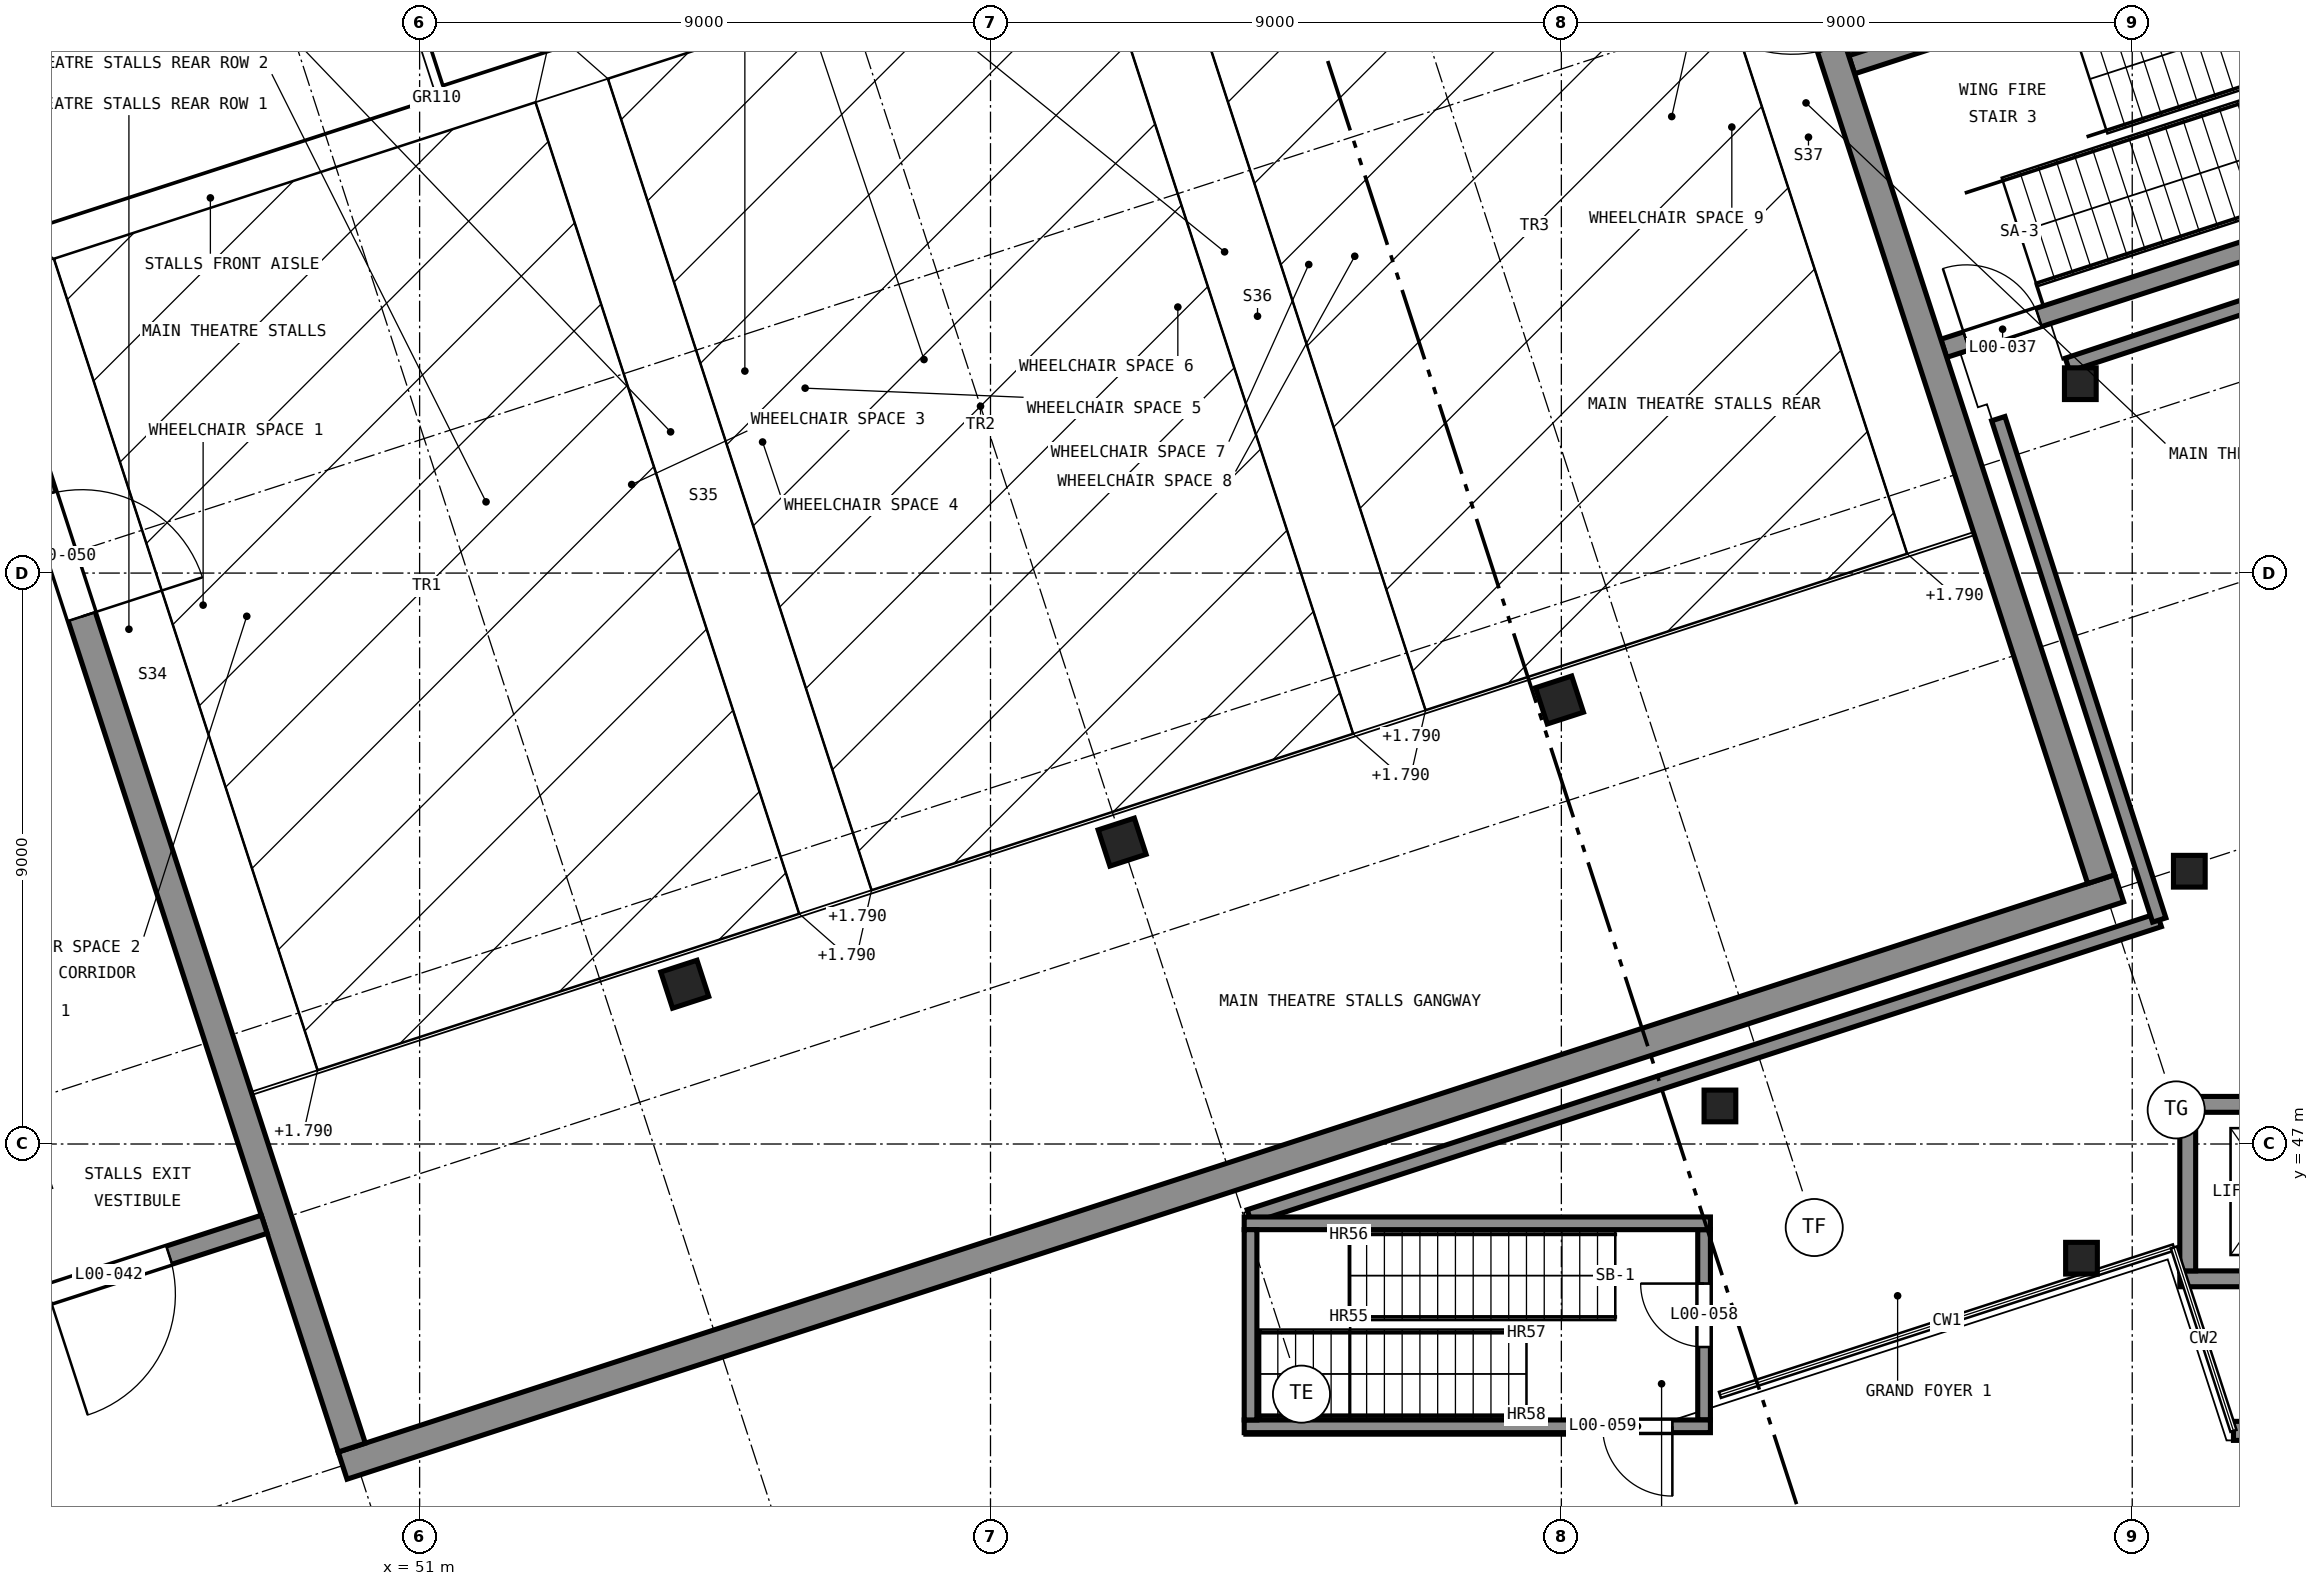
"""IFC4 building model, lengths in metres.
Left out: names, types, materials, properties, quantities, classifications, styles, units other than length and angle.
Written with IfcOpenShell. Run it as: python <this file> out.ifc"""

import sys

from ifc_helpers import new_model, si_unit, direction, frame, frame_2d, origin, origin_2d, place, context, subcontext, project, spatial, rectangle, extrude, element, fill, save


model = new_model("IFC4")
c1 = context("Model", 3, precision=1e-05, world=origin(), true_north=direction((0.0, 1.0)))
c2 = subcontext(c1, "Body", "Model", "MODEL_VIEW")
j1 = project(units=[si_unit("LENGTHUNIT", "METRE"), si_unit("PLANEANGLEUNIT", "RADIAN")], contexts=[c1])
p1 = place(None, origin())
s1 = spatial("IfcSite", under=j1, at=p1, CompositionType="ELEMENT")
p2 = place(p1, origin())
s2 = spatial("IfcBuilding", under=s1, at=p2, CompositionType="ELEMENT")
p3 = place(p2, origin())
s3 = spatial("IfcBuildingStorey", under=s2, at=p3, CompositionType="ELEMENT", Elevation=0.0)
p4 = place(p3, frame((49.786, 41.93, 0.0), z_axis=(0.0, 0.0, 1.0), x_axis=(0.951055937194, 0.309018776661, 0.0)))
e1 = element("IfcWall", 1, at=p4, inside=s3, PredefinedType="SHEAR", context=c2, shape_type="SweptSolid", body=[
    extrude(rectangle(XDim=29.45, YDim=0.45, at=frame_2d((14.725, 0.0))), origin(), (0.0, 0.0, 1.0), 5.5),
])
p5 = place(p3, frame((49.93, 42.214, 0.0), z_axis=(0.0, 0.0, 1.0), x_axis=(-0.309016215614, 0.95105676933, 0.0)))
e2 = element("IfcWall", 2, at=p5, inside=s3, PredefinedType="SHEAR", context=c2, shape_type="SweptSolid", body=[
    extrude(rectangle(XDim=27.975, YDim=0.45, at=frame_2d((13.988, 0.0))), origin(), (0.0, 0.0, 1.0), 5.5),
])
p6 = place(p5, frame((13.775, 0.0, 0.0)))
e3 = element("IfcOpeningElement", 3, at=p6, cuts=e2, PredefinedType="OPENING", context=c2, shape_type="SweptSolid", body=[
    extrude(rectangle(XDim=2.0, YDim=2.4, at=frame_2d((1.0, 1.2))), frame((0.0, 0.235, 0.0), z_axis=(0.0, -1.0, 0.0), x_axis=(1.0, 0.0, 0.0)), (0.0, 0.0, 1.0), 0.47),
])
p7 = place(p3, frame((77.511, 51.176, 0.0), z_axis=(0.0, 0.0, 1.0), x_axis=(-0.309018780445, 0.951055935964, 0.0)))
e4 = element("IfcWall", 4, at=p7, inside=s3, PredefinedType="SHEAR", context=c2, shape_type="SweptSolid", body=[
    extrude(rectangle(XDim=27.975, YDim=0.45, at=frame_2d((13.987, 0.0))), origin(), (0.0, 0.0, 1.0), 5.5),
])
p8 = place(p7, frame((13.775, 0.0, 0.0)))
e5 = element("IfcOpeningElement", 5, at=p8, cuts=e4, PredefinedType="OPENING", context=c2, shape_type="SweptSolid", body=[
    extrude(rectangle(XDim=2.0, YDim=2.4, at=frame_2d((1.0, 1.2))), frame((0.0, 0.235, 0.0), z_axis=(0.0, -1.0, 0.0), x_axis=(1.0, 0.0, 0.0)), (0.0, 0.0, 1.0), 0.47),
])
p9 = place(p3, frame((48.55, 45.735, 0.0), z_axis=(0.0, 0.0, 1.0), x_axis=(-0.951061216338, -0.309002528757, 0.0)))
e6 = element("IfcWall", 6, at=p9, inside=s3, PredefinedType="SOLIDWALL", context=c2, shape_type="SweptSolid", body=[
    extrude(rectangle(XDim=15.925, YDim=0.3, at=frame_2d((7.962, 0.0))), origin(), (0.0, 0.0, 1.0), 5.5),
])
p10 = place(p9, frame((13.075, 0.0, 0.0)))
e7 = element("IfcOpeningElement", 7, at=p10, cuts=e6, PredefinedType="OPENING", context=c2, shape_type="SweptSolid", body=[
    extrude(rectangle(XDim=1.2, YDim=2.1, at=frame_2d((0.6, 1.05))), frame((0.0, 0.16, 0.0), z_axis=(0.0, -1.0, 0.0), x_axis=(1.0, 0.0, 0.0)), (0.0, 0.0, 1.0), 0.32),
])
p11 = place(p9, frame((1.575, 0.0, 0.0)))
e8 = element("IfcOpeningElement", 8, at=p11, cuts=e6, PredefinedType="OPENING", context=c2, shape_type="SweptSolid", body=[
    extrude(rectangle(XDim=2.0, YDim=2.4, at=frame_2d((1.0, 1.2))), frame((0.0, 0.16, 0.0), z_axis=(0.0, -1.0, 0.0), x_axis=(1.0, 0.0, 0.0)), (0.0, 0.0, 1.0), 0.32),
])
p12 = place(p3, frame((75.029, 59.543, 0.0), z_axis=(0.0, 0.0, 1.0), x_axis=(0.951057649576, 0.309013506475, 0.0)))
e9 = element("IfcWall", 9, at=p12, inside=s3, PredefinedType="SOLIDWALL", context=c2, shape_type="SweptSolid", body=[
    extrude(rectangle(XDim=7.075, YDim=0.3, at=frame_2d((3.538, 0.0))), origin(), (0.0, 0.0, 1.0), 5.2),
])
p13 = place(p12, frame((0.375, 0.0, 0.0)))
e10 = element("IfcOpeningElement", 10, at=p13, cuts=e9, PredefinedType="OPENING", context=c2, shape_type="SweptSolid", body=[
    extrude(rectangle(XDim=1.2, YDim=2.1, at=frame_2d((0.6, 1.05))), frame((0.0, 0.16, 0.0), z_axis=(0.0, -1.0, 0.0), x_axis=(1.0, 0.0, 0.0)), (0.0, 0.0, 1.0), 0.32),
])
p14 = place(p3, frame((80.305, 66.199, 0.0), z_axis=(0.0, 0.0, 1.0), x_axis=(-0.951054354327, -0.309023648149, 0.0)))
e11 = element("IfcWall", 11, at=p14, inside=s3, PredefinedType="SOLIDWALL", context=c2, shape_type="SweptSolid", body=[
    extrude(rectangle(XDim=7.075, YDim=0.3, at=frame_2d((3.537, 0.0))), origin(), (0.0, 0.0, 1.0), 5.2),
])
for number, where, z_axis, x_axis in (
    (12, (55.18, 49.519, 0.0), (0.0, 0.0, 1.0), (0.951, 0.309, 0.0)),
    (13, (62.075, 51.759, 0.0), (0.0, 0.0, 1.0), (0.951, 0.309, 0.0)),
    (14, (68.97, 54.0, 0.0), (0.0, 0.0, 1.0), (0.951, 0.309, 0.0)),
):
    element("IfcColumn", number, at=place(p3, frame(where, z_axis=z_axis, x_axis=x_axis)), inside=s3, PredefinedType="COLUMN", context=c2, shape_type="SweptSolid", body=[
        extrude(rectangle(XDim=0.6, YDim=0.6, at=origin_2d()), origin(), (0.0, 0.0, 1.0), 0.55),
    ])
p15 = place(p3, frame((64.0, 42.55, 0.0), z_axis=(0.0, 0.0, 1.0), x_axis=(1.0, 0.0, 0.0)))
e15 = element("IfcWall", 15, at=p15, inside=s3, PredefinedType="SHEAR", context=c2, shape_type="SweptSolid", body=[
    extrude(rectangle(XDim=7.35, YDim=0.2, at=frame_2d((3.675, 0.0))), origin(), (0.0, 0.0, 1.0), 5.5),
])
p16 = place(p15, frame((5.65, 0.0, 0.0)))
e16 = element("IfcOpeningElement", 16, at=p16, cuts=e15, PredefinedType="OPENING", context=c2, shape_type="SweptSolid", body=[
    extrude(rectangle(XDim=1.1, YDim=2.1, at=frame_2d((0.55, 1.05))), frame((0.0, 0.11, 0.0), z_axis=(0.0, -1.0, 0.0), x_axis=(1.0, 0.0, 0.0)), (0.0, 0.0, 1.0), 0.22),
])
p17 = place(p3, frame((71.35, 45.75, 0.0), z_axis=(0.0, 0.0, 1.0), x_axis=(-1.0, 0.0, 0.0)))
e17 = element("IfcWall", 17, at=p17, inside=s3, PredefinedType="SHEAR", context=c2, shape_type="SweptSolid", body=[
    extrude(rectangle(XDim=7.35, YDim=0.2, at=frame_2d((3.675, 0.0))), origin(), (0.0, 0.0, 1.0), 5.5),
])
p18 = place(p3, frame((64.1, 45.65, 0.0), z_axis=(0.0, 0.0, 1.0), x_axis=(0.0, -1.0, 0.0)))
e18 = element("IfcWall", 18, at=p18, inside=s3, PredefinedType="SHEAR", context=c2, shape_type="SweptSolid", body=[
    extrude(rectangle(XDim=3.0, YDim=0.2, at=frame_2d((1.5, 0.0))), origin(), (0.0, 0.0, 1.0), 5.5),
])
p19 = place(p3, frame((71.25, 42.65, 0.0), z_axis=(0.0, 0.0, 1.0), x_axis=(0.0, 1.0, 0.0)))
e19 = element("IfcWall", 19, at=p19, inside=s3, PredefinedType="SHEAR", context=c2, shape_type="SweptSolid", body=[
    extrude(rectangle(XDim=3.0, YDim=0.2, at=frame_2d((1.5, 0.0))), origin(), (0.0, 0.0, 1.0), 5.5),
])
p20 = place(p19, frame((1.15, 0.0, 0.0)))
e20 = element("IfcOpeningElement", 20, at=p20, cuts=e19, PredefinedType="OPENING", context=c2, shape_type="SweptSolid", body=[
    extrude(rectangle(XDim=1.0, YDim=2.1, at=frame_2d((0.5, 1.05))), frame((0.0, 0.11, 0.0), z_axis=(0.0, -1.0, 0.0), x_axis=(1.0, 0.0, 0.0)), (0.0, 0.0, 1.0), 0.22),
])
for number, where, z_axis, x_axis in (
    (21, (78.75, 44.875, 0.0), (0.0, 0.0, 1.0), (1.0, 0.0, 0.0)),
    (22, (81.75, 47.625, 0.0), (0.0, 0.0, 1.0), (-1.0, 0.0, 0.0)),
):
    element("IfcWall", number, at=place(p3, frame(where, z_axis=z_axis, x_axis=x_axis)), inside=s3, PredefinedType="SHEAR", context=c2, shape_type="SweptSolid", body=[
        extrude(rectangle(XDim=3.0, YDim=0.25, at=frame_2d((1.5, 0.0))), origin(), (0.0, 0.0, 1.0), 5.5),
    ])
p21 = place(p3, frame((78.875, 47.5, 0.0), z_axis=(0.0, 0.0, 1.0), x_axis=(0.0, -1.0, 0.0)))
e23 = element("IfcWall", 23, at=p21, inside=s3, PredefinedType="SHEAR", context=c2, shape_type="SweptSolid", body=[
    extrude(rectangle(XDim=2.5, YDim=0.25, at=frame_2d((1.25, 0.0))), origin(), (0.0, 0.0, 1.0), 5.5),
])
for number, where, z_axis, x_axis in (
    (24, (77.2, 45.2, 0.0), (0.0, 0.0, 1.0), (1.0, 0.0, 0.0)),
    (25, (71.5, 47.6, 0.0), (0.0, 0.0, 1.0), (1.0, 0.0, 0.0)),
    (26, (78.9, 51.3, 0.0), (0.0, 0.0, 1.0), (1.0, 0.0, 0.0)),
    (27, (77.182, 58.985, 0.0), (0.0, 0.0, 1.0), (1.0, 0.0, 0.0)),
):
    element("IfcColumn", number, at=place(p3, frame(where, z_axis=z_axis, x_axis=x_axis)), inside=s3, PredefinedType="COLUMN", context=c2, shape_type="SweptSolid", body=[
        extrude(rectangle(XDim=0.5, YDim=0.5, at=origin_2d()), origin(), (0.0, 0.0, 1.0), 5.5),
    ])
p22 = place(p3, frame((79.596, 42.478, 0.0), z_axis=(0.0, 0.0, 1.0), x_axis=(1.0, 0.0, 0.0)))
e28 = element("IfcWall", 28, at=p22, inside=s3, PredefinedType="SOLIDWALL", context=c2, shape_type="SweptSolid", body=[
    extrude(rectangle(XDim=2.941, YDim=0.3, at=frame_2d((1.471, 0.0))), origin(), (0.0, 0.0, 1.0), 5.2),
])
p23 = place(p22, frame((0.345, 0.0, 0.0)))
e29 = element("IfcOpeningElement", 29, at=p23, cuts=e28, PredefinedType="OPENING", context=c2, shape_type="SweptSolid", body=[
    extrude(rectangle(XDim=2.2, YDim=2.4, at=frame_2d((1.1, 1.2))), frame((0.0, 0.16, 0.0), z_axis=(0.0, -1.0, 0.0), x_axis=(1.0, 0.0, 0.0)), (0.0, 0.0, 1.0), 0.32),
])
p24 = place(p3, frame((76.98, 59.283, 0.0), z_axis=(0.0, 0.0, 1.0), x_axis=(0.949534422978, 0.313662843798, 0.0)))
e30 = element("IfcWall", 30, at=p24, inside=s3, PredefinedType="SOLIDWALL", context=c2, shape_type="SweptSolid", body=[
    extrude(rectangle(XDim=5.971, YDim=0.22, at=frame_2d((2.985, 0.0))), origin(), (0.0, 0.0, 1.0), 5.2),
])
p25 = place(p3, frame((64.081, 45.859, 0.0), z_axis=(0.0, 0.0, 1.0), x_axis=(0.950848496094, 0.309656483019, 0.0)))
e31 = element("IfcWall", 31, at=p25, inside=s3, PredefinedType="SOLIDWALL", context=c2, shape_type="SweptSolid", body=[
    extrude(rectangle(XDim=15.086, YDim=0.22, at=frame_2d((7.543, 0.0))), origin(), (0.0, 0.0, 1.0), 5.2),
])
p26 = place(p3, frame((78.426, 50.531, 0.0), z_axis=(0.0, 0.0, 1.0), x_axis=(-0.30564642519, 0.952145084937, 0.0)))
e32 = element("IfcWall", 32, at=p26, inside=s3, PredefinedType="SOLIDWALL", context=c2, shape_type="SweptSolid", body=[
    extrude(rectangle(XDim=8.301, YDim=0.22, at=frame_2d((4.15, 0.0))), origin(), (0.0, 0.0, 1.0), 5.2),
])
p27 = place(p13, origin())
e33 = element("IfcDoor", 33, at=p27, inside=s3, OperationType="SINGLE_SWING_RIGHT", PredefinedType="DOOR", context=c2, shape_type="SweptSolid", body=[
    extrude(rectangle(XDim=1.2, YDim=2.1, at=frame_2d((0.6, 1.05))), frame((0.0, 0.025, 0.0), z_axis=(0.0, -1.0, 0.0), x_axis=(1.0, 0.0, 0.0)), (0.0, 0.0, 1.0), 0.05),
])
fill(e10, e33)
p28 = place(p11, origin())
e34 = element("IfcDoor", 34, at=p28, inside=s3, OperationType="DOUBLE_DOOR_SINGLE_SWING", PredefinedType="DOOR", context=c2, shape_type="SweptSolid", body=[
    extrude(rectangle(XDim=2.0, YDim=2.4, at=frame_2d((1.0, 1.2))), frame((0.0, 0.025, 0.0), z_axis=(0.0, -1.0, 0.0), x_axis=(1.0, 0.0, 0.0)), (0.0, 0.0, 1.0), 0.05),
])
fill(e8, e34)
p29 = place(p6, frame((2.0, 0.0, 0.0), z_axis=(0.0, 0.0, 1.0), x_axis=(-1.0, 0.0, 0.0)))
e35 = element("IfcDoor", 35, at=p29, inside=s3, OperationType="DOUBLE_DOOR_SINGLE_SWING", PredefinedType="DOOR", context=c2, shape_type="SweptSolid", body=[
    extrude(rectangle(XDim=2.0, YDim=2.4, at=frame_2d((1.0, 1.2))), frame((0.0, 0.025, 0.0), z_axis=(0.0, -1.0, 0.0), x_axis=(1.0, 0.0, 0.0)), (0.0, 0.0, 1.0), 0.05),
])
fill(e3, e35)
p30 = place(p20, origin())
e36 = element("IfcDoor", 36, at=p30, inside=s3, OperationType="SINGLE_SWING_LEFT", PredefinedType="DOOR", context=c2, shape_type="SweptSolid", body=[
    extrude(rectangle(XDim=1.0, YDim=2.1, at=frame_2d((0.5, 1.05))), frame((0.0, 0.025, 0.0), z_axis=(0.0, -1.0, 0.0), x_axis=(1.0, 0.0, 0.0)), (0.0, 0.0, 1.0), 0.05),
])
fill(e20, e36)
p31 = place(p16, frame((1.1, 0.0, 0.0), z_axis=(0.0, 0.0, 1.0), x_axis=(-1.0, 0.0, 0.0)))
e37 = element("IfcDoor", 37, at=p31, inside=s3, OperationType="SINGLE_SWING_RIGHT", PredefinedType="DOOR", context=c2, shape_type="SweptSolid", body=[
    extrude(rectangle(XDim=1.1, YDim=2.1, at=frame_2d((0.55, 1.05))), frame((0.0, 0.025, 0.0), z_axis=(0.0, -1.0, 0.0), x_axis=(1.0, 0.0, 0.0)), (0.0, 0.0, 1.0), 0.05),
])
fill(e16, e37)
save(model, sys.argv[1])
